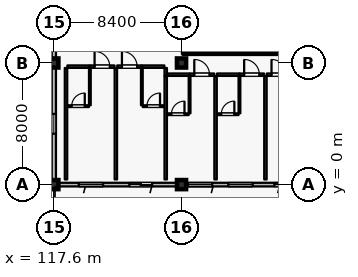
"""IFC4 building model, lengths in metres.
Left out: names, types, materials, properties, quantities, classifications, styles, units other than length and angle.
Written with IfcOpenShell. Run it as: python <this file> out.ifc"""

import sys

from ifc_helpers import new_model, si_unit, direction, frame, frame_2d, origin, origin_2d, place, context, subcontext, project, spatial, rectangle, hollow_rectangle, extrude, element, fill, save


model = new_model("IFC4")
c1 = context("Model", 3, precision=1e-05, world=origin(), true_north=direction((0.0, 1.0)))
c2 = subcontext(c1, "Body", "Model", "MODEL_VIEW")
j1 = project(units=[si_unit("LENGTHUNIT", "METRE"), si_unit("PLANEANGLEUNIT", "RADIAN")], contexts=[c1])
p1 = place(None, origin())
s1 = spatial("IfcSite", under=j1, at=p1, CompositionType="ELEMENT")
p2 = place(p1, origin())
s2 = spatial("IfcBuilding", under=s1, at=p2, CompositionType="ELEMENT")
p3 = place(p2, frame((0.0, 0.0, 39.6)))
s3 = spatial("IfcBuildingStorey", under=s2, at=p3, CompositionType="ELEMENT", Elevation=39.6)
for number, where, z_axis, x_axis in (
    (1, (117.6, 0.0, 0.0), (0.0, 0.0, 1.0), (1.0, 0.0, 0.0)),
    (2, (126.0, 0.0, 0.0), (0.0, 0.0, 1.0), (1.0, 0.0, 0.0)),
    (3, (117.6, 8.0, 0.0), (0.0, 0.0, 1.0), (1.0, 0.0, 0.0)),
    (4, (126.0, 8.0, 0.0), (0.0, 0.0, 1.0), (1.0, 0.0, 0.0)),
):
    element("IfcColumn", number, at=place(p3, frame(where, z_axis=z_axis, x_axis=x_axis)), inside=s3, PredefinedType="COLUMN", context=c2, shape_type="SweptSolid", body=[
        extrude(rectangle(XDim=0.6, YDim=0.6, at=origin_2d()), origin(), (0.0, 0.0, 1.0), 3.6),
    ])
p4 = place(p3, frame((125.7, 0.0, 0.0), z_axis=(0.0, 0.0, 1.0), x_axis=(-1.0, 0.0, 0.0)))
e5 = element("IfcWall", 5, at=p4, inside=s3, PredefinedType="SOLIDWALL", context=c2, shape_type="SweptSolid", body=[
    extrude(rectangle(XDim=7.8, YDim=0.24, at=frame_2d((3.9, 0.0))), origin(), (0.0, 0.0, 1.0), 2.89),
])
p5 = place(p4, frame((1.63, 0.0, 0.0)))
e6 = element("IfcOpeningElement", 6, at=p5, cuts=e5, PredefinedType="OPENING", context=c2, shape_type="SweptSolid", body=[
    extrude(rectangle(XDim=1.5, YDim=2.25, at=frame_2d((0.75, 1.125))), frame((0.0, 0.13, 0.0), z_axis=(0.0, -1.0, 0.0), x_axis=(1.0, 0.0, 0.0)), (0.0, 0.0, 1.0), 0.26),
])
p6 = place(p4, frame((4.86, 0.0, 0.8)))
e7 = element("IfcOpeningElement", 7, at=p6, cuts=e5, PredefinedType="OPENING", context=c2, shape_type="SweptSolid", body=[
    extrude(rectangle(XDim=1.6, YDim=1.6, at=frame_2d((0.8, 0.8))), frame((0.0, 0.13, 0.0), z_axis=(0.0, -1.0, 0.0), x_axis=(1.0, 0.0, 0.0)), (0.0, 0.0, 1.0), 0.26),
])
p7 = place(p3, frame((134.1, 0.0, 0.0), z_axis=(0.0, 0.0, 1.0), x_axis=(-1.0, 0.0, 0.0)))
e8 = element("IfcWall", 8, at=p7, inside=s3, PredefinedType="SOLIDWALL", context=c2, shape_type="SweptSolid", body=[
    extrude(rectangle(XDim=7.8, YDim=0.24, at=frame_2d((3.9, 0.0))), origin(), (0.0, 0.0, 1.0), 2.89),
])
p8 = place(p7, frame((0.49, 0.0, 0.0)))
e9 = element("IfcOpeningElement", 9, at=p8, cuts=e8, PredefinedType="OPENING", context=c2, shape_type="SweptSolid", body=[
    extrude(rectangle(XDim=1.5, YDim=2.25, at=frame_2d((0.75, 1.125))), frame((0.0, 0.13, 0.0), z_axis=(0.0, -1.0, 0.0), x_axis=(1.0, 0.0, 0.0)), (0.0, 0.0, 1.0), 0.26),
])
p9 = place(p7, frame((3.42, 0.0, 0.8)))
e10 = element("IfcOpeningElement", 10, at=p9, cuts=e8, PredefinedType="OPENING", context=c2, shape_type="SweptSolid", body=[
    extrude(rectangle(XDim=1.6, YDim=1.6, at=frame_2d((0.8, 0.8))), frame((0.0, 0.13, 0.0), z_axis=(0.0, -1.0, 0.0), x_axis=(1.0, 0.0, 0.0)), (0.0, 0.0, 1.0), 0.26),
])
p10 = place(p7, frame((6.08, 0.0, 0.8)))
e11 = element("IfcOpeningElement", 11, at=p10, cuts=e8, PredefinedType="OPENING", context=c2, shape_type="SweptSolid", body=[
    extrude(rectangle(XDim=1.6, YDim=1.6, at=frame_2d((0.8, 0.8))), frame((0.0, 0.13, 0.0), z_axis=(0.0, -1.0, 0.0), x_axis=(1.0, 0.0, 0.0)), (0.0, 0.0, 1.0), 0.26),
])
p11 = place(p3, frame((117.6, 0.3, 0.0), z_axis=(0.0, 0.0, 1.0), x_axis=(0.0, 1.0, 0.0)))
e12 = element("IfcWall", 12, at=p11, inside=s3, PredefinedType="SOLIDWALL", context=c2, shape_type="SweptSolid", body=[
    extrude(rectangle(XDim=7.4, YDim=0.28, at=frame_2d((3.7, 0.0))), origin(), (0.0, 0.0, 1.0), 2.7),
])
p12 = place(p11, frame((3.05, 0.0, 0.5)))
e13 = element("IfcOpeningElement", 13, at=p12, cuts=e12, PredefinedType="OPENING", context=c2, shape_type="SweptSolid", body=[
    extrude(rectangle(XDim=1.3, YDim=1.65, at=frame_2d((0.65, 0.825))), frame((0.0, 0.15, 0.0), z_axis=(0.0, -1.0, 0.0), x_axis=(1.0, 0.0, 0.0)), (0.0, 0.0, 1.0), 0.3),
])
p13 = place(p3, frame((117.6, 8.3, 0.0), z_axis=(0.0, 0.0, 1.0), x_axis=(0.0, 1.0, 0.0)))
e14 = element("IfcWall", 14, at=p13, inside=s3, PredefinedType="SOLIDWALL", context=c2, shape_type="SweptSolid", body=[
    extrude(rectangle(XDim=7.4, YDim=0.28, at=frame_2d((3.7, 0.0))), origin(), (0.0, 0.0, 1.0), 2.7),
])
p14 = place(p13, frame((3.05, 0.0, 0.5)))
e15 = element("IfcOpeningElement", 15, at=p14, cuts=e14, PredefinedType="OPENING", context=c2, shape_type="SweptSolid", body=[
    extrude(rectangle(XDim=1.3, YDim=1.65, at=frame_2d((0.65, 0.825))), frame((0.0, 0.15, 0.0), z_axis=(0.0, -1.0, 0.0), x_axis=(1.0, 0.0, 0.0)), (0.0, 0.0, 1.0), 0.3),
])
p15 = place(p3, frame((126.1, 8.8, 0.0), z_axis=(0.0, 0.0, 1.0), x_axis=(1.0, 0.0, 0.0)))
e16 = element("IfcWall", 16, at=p15, inside=s3, PredefinedType="SHEAR", context=c2, shape_type="SweptSolid", body=[
    extrude(rectangle(XDim=8.2, YDim=0.4, at=frame_2d((4.1, 0.0))), origin(), (0.0, 0.0, 1.0), 3.335),
])
for number, where, z_axis, x_axis in (
    (17, (126.48, 8.8, 0.0), (0.0, 0.0, 1.0), (1.0, 0.0, 0.0)),
    (18, (127.74, 8.8, 0.0), (0.0, 0.0, 1.0), (1.0, 0.0, 0.0)),
):
    element("IfcColumn", number, at=place(p3, frame(where, z_axis=z_axis, x_axis=x_axis)), inside=s3, PredefinedType="COLUMN", context=c2, shape_type="SweptSolid", body=[
        extrude(hollow_rectangle(XDim=0.3, YDim=0.3, WallThickness=0.012, at=origin_2d()), origin(), (0.0, 0.0, 1.0), 3.42),
    ])
p16 = place(p3, frame((118.49, 7.76, 0.0), z_axis=(0.0, 0.0, 1.0), x_axis=(1.0, 0.0, 0.0)))
e19 = element("IfcWall", 19, at=p16, inside=s3, PredefinedType="PARTITIONING", context=c2, shape_type="SweptSolid", body=[
    extrude(rectangle(XDim=1.47, YDim=0.16, at=frame_2d((0.735, 0.0))), origin(), (0.0, 0.0, 1.0), 3.335),
])
p17 = place(p3, frame((119.97, 7.76, 0.0), z_axis=(0.0, 0.0, 1.0), x_axis=(1.0, 0.0, 0.0)))
e20 = element("IfcWall", 20, at=p17, inside=s3, PredefinedType="PARTITIONING", context=c2, shape_type="SweptSolid", body=[
    extrude(rectangle(XDim=1.62, YDim=0.16, at=frame_2d((0.81, 0.0))), origin(), (0.0, 0.0, 1.0), 3.335),
])
p18 = place(p17, frame((0.31, 0.0, 0.0)))
e21 = element("IfcOpeningElement", 21, at=p18, cuts=e20, PredefinedType="OPENING", context=c2, shape_type="SweptSolid", body=[
    extrude(rectangle(XDim=1.0, YDim=2.25, at=frame_2d((0.5, 1.125))), frame((0.0, 0.09, 0.0), z_axis=(0.0, -1.0, 0.0), x_axis=(1.0, 0.0, 0.0)), (0.0, 0.0, 1.0), 0.18),
])
p19 = place(p3, frame((119.97, 5.22, 0.0), z_axis=(0.0, 0.0, 1.0), x_axis=(0.0, 1.0, 0.0)))
e22 = element("IfcWall", 22, at=p19, inside=s3, PredefinedType="PARTITIONING", context=c2, shape_type="SweptSolid", body=[
    extrude(rectangle(XDim=2.45, YDim=0.115, at=frame_2d((1.225, 0.0))), origin(), (0.0, 0.0, 1.0), 3.335),
])
p20 = place(p3, frame((118.5, 5.16, 0.0), z_axis=(0.0, 0.0, 1.0), x_axis=(1.0, 0.0, 0.0)))
e23 = element("IfcWall", 23, at=p20, inside=s3, PredefinedType="PARTITIONING", context=c2, shape_type="SweptSolid", body=[
    extrude(rectangle(XDim=1.41, YDim=0.115, at=frame_2d((0.705, 0.0))), origin(), (0.0, 0.0, 1.0), 3.335),
])
p21 = place(p20, frame((0.275, 0.0, 0.0)))
e24 = element("IfcOpeningElement", 24, at=p21, cuts=e23, PredefinedType="OPENING", context=c2, shape_type="SweptSolid", body=[
    extrude(rectangle(XDim=0.86, YDim=2.12, at=frame_2d((0.43, 1.06))), frame((0.0, 0.067, 0.0), z_axis=(0.0, -1.0, 0.0), x_axis=(1.0, 0.0, 0.0)), (0.0, 0.0, 1.0), 0.135),
])
p22 = place(p3, frame((118.4, 0.34, 0.0), z_axis=(0.0, 0.0, 1.0), x_axis=(0.0, 1.0, 0.0)))
e25 = element("IfcWall", 25, at=p22, inside=s3, PredefinedType="PARTITIONING", context=c2, shape_type="SweptSolid", body=[
    extrude(rectangle(XDim=7.33, YDim=0.16, at=frame_2d((3.665, 0.0))), origin(), (0.0, 0.0, 1.0), 3.335),
])
p23 = place(p3, frame((121.77, 7.76, 0.0), z_axis=(0.0, 0.0, 1.0), x_axis=(1.0, 0.0, 0.0)))
e26 = element("IfcWall", 26, at=p23, inside=s3, PredefinedType="PARTITIONING", context=c2, shape_type="SweptSolid", body=[
    extrude(rectangle(XDim=1.62, YDim=0.16, at=frame_2d((0.81, 0.0))), origin(), (0.0, 0.0, 1.0), 3.335),
])
p24 = place(p23, frame((0.31, 0.0, 0.0)))
e27 = element("IfcOpeningElement", 27, at=p24, cuts=e26, PredefinedType="OPENING", context=c2, shape_type="SweptSolid", body=[
    extrude(rectangle(XDim=1.0, YDim=2.25, at=frame_2d((0.5, 1.125))), frame((0.0, 0.09, 0.0), z_axis=(0.0, -1.0, 0.0), x_axis=(1.0, 0.0, 0.0)), (0.0, 0.0, 1.0), 0.18),
])
p25 = place(p3, frame((123.4, 7.76, 0.0), z_axis=(0.0, 0.0, 1.0), x_axis=(1.0, 0.0, 0.0)))
e28 = element("IfcWall", 28, at=p25, inside=s3, PredefinedType="PARTITIONING", context=c2, shape_type="SweptSolid", body=[
    extrude(rectangle(XDim=1.47, YDim=0.16, at=frame_2d((0.735, 0.0))), origin(), (0.0, 0.0, 1.0), 3.335),
])
p26 = place(p3, frame((123.39, 5.22, 0.0), z_axis=(0.0, 0.0, 1.0), x_axis=(0.0, 1.0, 0.0)))
e29 = element("IfcWall", 29, at=p26, inside=s3, PredefinedType="PARTITIONING", context=c2, shape_type="SweptSolid", body=[
    extrude(rectangle(XDim=2.45, YDim=0.115, at=frame_2d((1.225, 0.0))), origin(), (0.0, 0.0, 1.0), 3.335),
])
p27 = place(p3, frame((123.45, 5.16, 0.0), z_axis=(0.0, 0.0, 1.0), x_axis=(1.0, 0.0, 0.0)))
e30 = element("IfcWall", 30, at=p27, inside=s3, PredefinedType="PARTITIONING", context=c2, shape_type="SweptSolid", body=[
    extrude(rectangle(XDim=1.41, YDim=0.115, at=frame_2d((0.705, 0.0))), origin(), (0.0, 0.0, 1.0), 3.335),
])
p28 = place(p27, frame((0.275, 0.0, 0.0)))
e31 = element("IfcOpeningElement", 31, at=p28, cuts=e30, PredefinedType="OPENING", context=c2, shape_type="SweptSolid", body=[
    extrude(rectangle(XDim=0.86, YDim=2.12, at=frame_2d((0.43, 1.06))), frame((0.0, 0.067, 0.0), z_axis=(0.0, -1.0, 0.0), x_axis=(1.0, 0.0, 0.0)), (0.0, 0.0, 1.0), 0.135),
])
p29 = place(p3, frame((121.68, 0.34, 0.0), z_axis=(0.0, 0.0, 1.0), x_axis=(0.0, 1.0, 0.0)))
e32 = element("IfcWall", 32, at=p29, inside=s3, PredefinedType="PARTITIONING", context=c2, shape_type="SweptSolid", body=[
    extrude(rectangle(XDim=7.33, YDim=0.16, at=frame_2d((3.665, 0.0))), origin(), (0.0, 0.0, 1.0), 3.335),
])
p30 = place(p3, frame((124.96, 7.15, 0.0), z_axis=(0.0, 0.0, 1.0), x_axis=(0.0, 1.0, 0.0)))
e33 = element("IfcWall", 33, at=p30, inside=s3, PredefinedType="PARTITIONING", context=c2, shape_type="SweptSolid", body=[
    extrude(rectangle(XDim=0.52, YDim=0.16, at=frame_2d((0.26, 0.0))), origin(), (0.0, 0.0, 1.0), 3.335),
])
p31 = place(p3, frame((125.05, 7.23, 0.0), z_axis=(0.0, 0.0, 1.0), x_axis=(1.0, 0.0, 0.0)))
e34 = element("IfcWall", 34, at=p31, inside=s3, PredefinedType="PARTITIONING", context=c2, shape_type="SweptSolid", body=[
    extrude(rectangle(XDim=1.47, YDim=0.16, at=frame_2d((0.735, 0.0))), origin(), (0.0, 0.0, 1.0), 3.335),
])
p32 = place(p3, frame((126.53, 7.23, 0.0), z_axis=(0.0, 0.0, 1.0), x_axis=(1.0, 0.0, 0.0)))
e35 = element("IfcWall", 35, at=p32, inside=s3, PredefinedType="PARTITIONING", context=c2, shape_type="SweptSolid", body=[
    extrude(rectangle(XDim=1.62, YDim=0.16, at=frame_2d((0.81, 0.0))), origin(), (0.0, 0.0, 1.0), 3.335),
])
p33 = place(p32, frame((0.31, 0.0, 0.0)))
e36 = element("IfcOpeningElement", 36, at=p33, cuts=e35, PredefinedType="OPENING", context=c2, shape_type="SweptSolid", body=[
    extrude(rectangle(XDim=1.0, YDim=2.25, at=frame_2d((0.5, 1.125))), frame((0.0, 0.09, 0.0), z_axis=(0.0, -1.0, 0.0), x_axis=(1.0, 0.0, 0.0)), (0.0, 0.0, 1.0), 0.18),
])
p34 = place(p3, frame((126.53, 4.69, 0.0), z_axis=(0.0, 0.0, 1.0), x_axis=(0.0, 1.0, 0.0)))
e37 = element("IfcWall", 37, at=p34, inside=s3, PredefinedType="PARTITIONING", context=c2, shape_type="SweptSolid", body=[
    extrude(rectangle(XDim=2.45, YDim=0.115, at=frame_2d((1.225, 0.0))), origin(), (0.0, 0.0, 1.0), 3.335),
])
p35 = place(p3, frame((125.06, 4.63, 0.0), z_axis=(0.0, 0.0, 1.0), x_axis=(1.0, 0.0, 0.0)))
e38 = element("IfcWall", 38, at=p35, inside=s3, PredefinedType="PARTITIONING", context=c2, shape_type="SweptSolid", body=[
    extrude(rectangle(XDim=1.41, YDim=0.115, at=frame_2d((0.705, 0.0))), origin(), (0.0, 0.0, 1.0), 3.335),
])
p36 = place(p35, frame((0.275, 0.0, 0.0)))
e39 = element("IfcOpeningElement", 39, at=p36, cuts=e38, PredefinedType="OPENING", context=c2, shape_type="SweptSolid", body=[
    extrude(rectangle(XDim=0.86, YDim=2.12, at=frame_2d((0.43, 1.06))), frame((0.0, 0.067, 0.0), z_axis=(0.0, -1.0, 0.0), x_axis=(1.0, 0.0, 0.0)), (0.0, 0.0, 1.0), 0.135),
])
p37 = place(p3, frame((124.96, 0.34, 0.0), z_axis=(0.0, 0.0, 1.0), x_axis=(0.0, 1.0, 0.0)))
e40 = element("IfcWall", 40, at=p37, inside=s3, PredefinedType="PARTITIONING", context=c2, shape_type="SweptSolid", body=[
    extrude(rectangle(XDim=6.8, YDim=0.16, at=frame_2d((3.4, 0.0))), origin(), (0.0, 0.0, 1.0), 3.335),
])
p38 = place(p3, frame((128.33, 7.23, 0.0), z_axis=(0.0, 0.0, 1.0), x_axis=(1.0, 0.0, 0.0)))
e41 = element("IfcWall", 41, at=p38, inside=s3, PredefinedType="PARTITIONING", context=c2, shape_type="SweptSolid", body=[
    extrude(rectangle(XDim=1.47, YDim=0.16, at=frame_2d((0.735, 0.0))), origin(), (0.0, 0.0, 1.0), 3.335),
])
p39 = place(p3, frame((129.81, 7.23, 0.0), z_axis=(0.0, 0.0, 1.0), x_axis=(1.0, 0.0, 0.0)))
e42 = element("IfcWall", 42, at=p39, inside=s3, PredefinedType="PARTITIONING", context=c2, shape_type="SweptSolid", body=[
    extrude(rectangle(XDim=1.62, YDim=0.16, at=frame_2d((0.81, 0.0))), origin(), (0.0, 0.0, 1.0), 3.335),
])
p40 = place(p39, frame((0.31, 0.0, 0.0)))
e43 = element("IfcOpeningElement", 43, at=p40, cuts=e42, PredefinedType="OPENING", context=c2, shape_type="SweptSolid", body=[
    extrude(rectangle(XDim=1.0, YDim=2.25, at=frame_2d((0.5, 1.125))), frame((0.0, 0.09, 0.0), z_axis=(0.0, -1.0, 0.0), x_axis=(1.0, 0.0, 0.0)), (0.0, 0.0, 1.0), 0.18),
])
p41 = place(p3, frame((129.81, 4.69, 0.0), z_axis=(0.0, 0.0, 1.0), x_axis=(0.0, 1.0, 0.0)))
e44 = element("IfcWall", 44, at=p41, inside=s3, PredefinedType="PARTITIONING", context=c2, shape_type="SweptSolid", body=[
    extrude(rectangle(XDim=2.45, YDim=0.115, at=frame_2d((1.225, 0.0))), origin(), (0.0, 0.0, 1.0), 3.335),
])
p42 = place(p3, frame((128.34, 4.63, 0.0), z_axis=(0.0, 0.0, 1.0), x_axis=(1.0, 0.0, 0.0)))
e45 = element("IfcWall", 45, at=p42, inside=s3, PredefinedType="PARTITIONING", context=c2, shape_type="SweptSolid", body=[
    extrude(rectangle(XDim=1.41, YDim=0.115, at=frame_2d((0.705, 0.0))), origin(), (0.0, 0.0, 1.0), 3.335),
])
p43 = place(p42, frame((0.275, 0.0, 0.0)))
e46 = element("IfcOpeningElement", 46, at=p43, cuts=e45, PredefinedType="OPENING", context=c2, shape_type="SweptSolid", body=[
    extrude(rectangle(XDim=0.86, YDim=2.12, at=frame_2d((0.43, 1.06))), frame((0.0, 0.067, 0.0), z_axis=(0.0, -1.0, 0.0), x_axis=(1.0, 0.0, 0.0)), (0.0, 0.0, 1.0), 0.135),
])
p44 = place(p3, frame((128.24, 0.34, 0.0), z_axis=(0.0, 0.0, 1.0), x_axis=(0.0, 1.0, 0.0)))
e47 = element("IfcWall", 47, at=p44, inside=s3, PredefinedType="PARTITIONING", context=c2, shape_type="SweptSolid", body=[
    extrude(rectangle(XDim=6.8, YDim=0.16, at=frame_2d((3.4, 0.0))), origin(), (0.0, 0.0, 1.0), 3.335),
])
p45 = place(p3, frame((131.61, 7.23, 0.0), z_axis=(0.0, 0.0, 1.0), x_axis=(1.0, 0.0, 0.0)))
e48 = element("IfcWall", 48, at=p45, inside=s3, PredefinedType="PARTITIONING", context=c2, shape_type="SweptSolid", body=[
    extrude(rectangle(XDim=1.62, YDim=0.16, at=frame_2d((0.81, 0.0))), origin(), (0.0, 0.0, 1.0), 3.335),
])
p46 = place(p45, frame((0.31, 0.0, 0.0)))
e49 = element("IfcOpeningElement", 49, at=p46, cuts=e48, PredefinedType="OPENING", context=c2, shape_type="SweptSolid", body=[
    extrude(rectangle(XDim=1.0, YDim=2.25, at=frame_2d((0.5, 1.125))), frame((0.0, 0.09, 0.0), z_axis=(0.0, -1.0, 0.0), x_axis=(1.0, 0.0, 0.0)), (0.0, 0.0, 1.0), 0.18),
])
p47 = place(p3, frame((131.52, 0.34, 0.0), z_axis=(0.0, 0.0, 1.0), x_axis=(0.0, 1.0, 0.0)))
e50 = element("IfcWall", 50, at=p47, inside=s3, PredefinedType="PARTITIONING", context=c2, shape_type="SweptSolid", body=[
    extrude(rectangle(XDim=6.8, YDim=0.16, at=frame_2d((3.4, 0.0))), origin(), (0.0, 0.0, 1.0), 3.335),
])
p48 = place(p5, origin())
e51 = element("IfcDoor", 51, at=p48, inside=s3, OperationType="SLIDING_TO_LEFT", PredefinedType="DOOR", context=c2, shape_type="SweptSolid", body=[
    extrude(rectangle(XDim=1.5, YDim=2.25, at=frame_2d((0.75, 1.125))), frame((0.0, 0.025, 0.0), z_axis=(0.0, -1.0, 0.0), x_axis=(1.0, 0.0, 0.0)), (0.0, 0.0, 1.0), 0.05),
])
fill(e6, e51)
p49 = place(p6, origin())
e52 = element("IfcWindow", 52, at=p49, inside=s3, PartitioningType="SINGLE_PANEL", PredefinedType="WINDOW", context=c2, shape_type="SweptSolid", body=[
    extrude(rectangle(XDim=1.6, YDim=1.6, at=frame_2d((0.8, 0.8))), frame((0.0, 0.03, 0.0), z_axis=(0.0, -1.0, 0.0), x_axis=(1.0, 0.0, 0.0)), (0.0, 0.0, 1.0), 0.06),
])
fill(e7, e52)
p50 = place(p8, origin())
e53 = element("IfcDoor", 53, at=p50, inside=s3, OperationType="SLIDING_TO_LEFT", PredefinedType="DOOR", context=c2, shape_type="SweptSolid", body=[
    extrude(rectangle(XDim=1.5, YDim=2.25, at=frame_2d((0.75, 1.125))), frame((0.0, 0.025, 0.0), z_axis=(0.0, -1.0, 0.0), x_axis=(1.0, 0.0, 0.0)), (0.0, 0.0, 1.0), 0.05),
])
fill(e9, e53)
p51 = place(p9, origin())
e54 = element("IfcWindow", 54, at=p51, inside=s3, PartitioningType="SINGLE_PANEL", PredefinedType="WINDOW", context=c2, shape_type="SweptSolid", body=[
    extrude(rectangle(XDim=1.6, YDim=1.6, at=frame_2d((0.8, 0.8))), frame((0.0, 0.03, 0.0), z_axis=(0.0, -1.0, 0.0), x_axis=(1.0, 0.0, 0.0)), (0.0, 0.0, 1.0), 0.06),
])
fill(e10, e54)
p52 = place(p10, origin())
e55 = element("IfcWindow", 55, at=p52, inside=s3, PartitioningType="SINGLE_PANEL", PredefinedType="WINDOW", context=c2, shape_type="SweptSolid", body=[
    extrude(rectangle(XDim=1.6, YDim=1.6, at=frame_2d((0.8, 0.8))), frame((0.0, 0.03, 0.0), z_axis=(0.0, -1.0, 0.0), x_axis=(1.0, 0.0, 0.0)), (0.0, 0.0, 1.0), 0.06),
])
fill(e11, e55)
p53 = place(p12, origin())
e56 = element("IfcWindow", 56, at=p53, inside=s3, PartitioningType="SINGLE_PANEL", PredefinedType="WINDOW", context=c2, shape_type="SweptSolid", body=[
    extrude(rectangle(XDim=1.3, YDim=1.65, at=frame_2d((0.65, 0.825))), frame((0.0, 0.03, 0.0), z_axis=(0.0, -1.0, 0.0), x_axis=(1.0, 0.0, 0.0)), (0.0, 0.0, 1.0), 0.06),
])
fill(e13, e56)
p54 = place(p18, origin())
e57 = element("IfcDoor", 57, at=p54, inside=s3, OperationType="SINGLE_SWING_LEFT", PredefinedType="DOOR", context=c2, shape_type="SweptSolid", body=[
    extrude(rectangle(XDim=1.0, YDim=2.25, at=frame_2d((0.5, 1.125))), frame((0.0, 0.025, 0.0), z_axis=(0.0, -1.0, 0.0), x_axis=(1.0, 0.0, 0.0)), (0.0, 0.0, 1.0), 0.05),
])
fill(e21, e57)
p55 = place(p21, origin())
e58 = element("IfcDoor", 58, at=p55, inside=s3, OperationType="SINGLE_SWING_RIGHT", PredefinedType="DOOR", context=c2, shape_type="SweptSolid", body=[
    extrude(rectangle(XDim=0.86, YDim=2.12, at=frame_2d((0.43, 1.06))), frame((0.0, 0.025, 0.0), z_axis=(0.0, -1.0, 0.0), x_axis=(1.0, 0.0, 0.0)), (0.0, 0.0, 1.0), 0.05),
])
fill(e24, e58)
p56 = place(p24, origin())
e59 = element("IfcDoor", 59, at=p56, inside=s3, OperationType="SINGLE_SWING_LEFT", PredefinedType="DOOR", context=c2, shape_type="SweptSolid", body=[
    extrude(rectangle(XDim=1.0, YDim=2.25, at=frame_2d((0.5, 1.125))), frame((0.0, 0.025, 0.0), z_axis=(0.0, -1.0, 0.0), x_axis=(1.0, 0.0, 0.0)), (0.0, 0.0, 1.0), 0.05),
])
fill(e27, e59)
p57 = place(p28, origin())
e60 = element("IfcDoor", 60, at=p57, inside=s3, OperationType="SINGLE_SWING_RIGHT", PredefinedType="DOOR", context=c2, shape_type="SweptSolid", body=[
    extrude(rectangle(XDim=0.86, YDim=2.12, at=frame_2d((0.43, 1.06))), frame((0.0, 0.025, 0.0), z_axis=(0.0, -1.0, 0.0), x_axis=(1.0, 0.0, 0.0)), (0.0, 0.0, 1.0), 0.05),
])
fill(e31, e60)
p58 = place(p33, origin())
e61 = element("IfcDoor", 61, at=p58, inside=s3, OperationType="SINGLE_SWING_LEFT", PredefinedType="DOOR", context=c2, shape_type="SweptSolid", body=[
    extrude(rectangle(XDim=1.0, YDim=2.25, at=frame_2d((0.5, 1.125))), frame((0.0, 0.025, 0.0), z_axis=(0.0, -1.0, 0.0), x_axis=(1.0, 0.0, 0.0)), (0.0, 0.0, 1.0), 0.05),
])
fill(e36, e61)
p59 = place(p36, origin())
e62 = element("IfcDoor", 62, at=p59, inside=s3, OperationType="SINGLE_SWING_RIGHT", PredefinedType="DOOR", context=c2, shape_type="SweptSolid", body=[
    extrude(rectangle(XDim=0.86, YDim=2.12, at=frame_2d((0.43, 1.06))), frame((0.0, 0.025, 0.0), z_axis=(0.0, -1.0, 0.0), x_axis=(1.0, 0.0, 0.0)), (0.0, 0.0, 1.0), 0.05),
])
fill(e39, e62)
p60 = place(p40, origin())
e63 = element("IfcDoor", 63, at=p60, inside=s3, OperationType="SINGLE_SWING_LEFT", PredefinedType="DOOR", context=c2, shape_type="SweptSolid", body=[
    extrude(rectangle(XDim=1.0, YDim=2.25, at=frame_2d((0.5, 1.125))), frame((0.0, 0.025, 0.0), z_axis=(0.0, -1.0, 0.0), x_axis=(1.0, 0.0, 0.0)), (0.0, 0.0, 1.0), 0.05),
])
fill(e43, e63)
p61 = place(p43, origin())
e64 = element("IfcDoor", 64, at=p61, inside=s3, OperationType="SINGLE_SWING_RIGHT", PredefinedType="DOOR", context=c2, shape_type="SweptSolid", body=[
    extrude(rectangle(XDim=0.86, YDim=2.12, at=frame_2d((0.43, 1.06))), frame((0.0, 0.025, 0.0), z_axis=(0.0, -1.0, 0.0), x_axis=(1.0, 0.0, 0.0)), (0.0, 0.0, 1.0), 0.05),
])
fill(e46, e64)
p62 = place(p46, origin())
e65 = element("IfcDoor", 65, at=p62, inside=s3, OperationType="SINGLE_SWING_LEFT", PredefinedType="DOOR", context=c2, shape_type="SweptSolid", body=[
    extrude(rectangle(XDim=1.0, YDim=2.25, at=frame_2d((0.5, 1.125))), frame((0.0, 0.025, 0.0), z_axis=(0.0, -1.0, 0.0), x_axis=(1.0, 0.0, 0.0)), (0.0, 0.0, 1.0), 0.05),
])
fill(e49, e65)
save(model, sys.argv[1])
